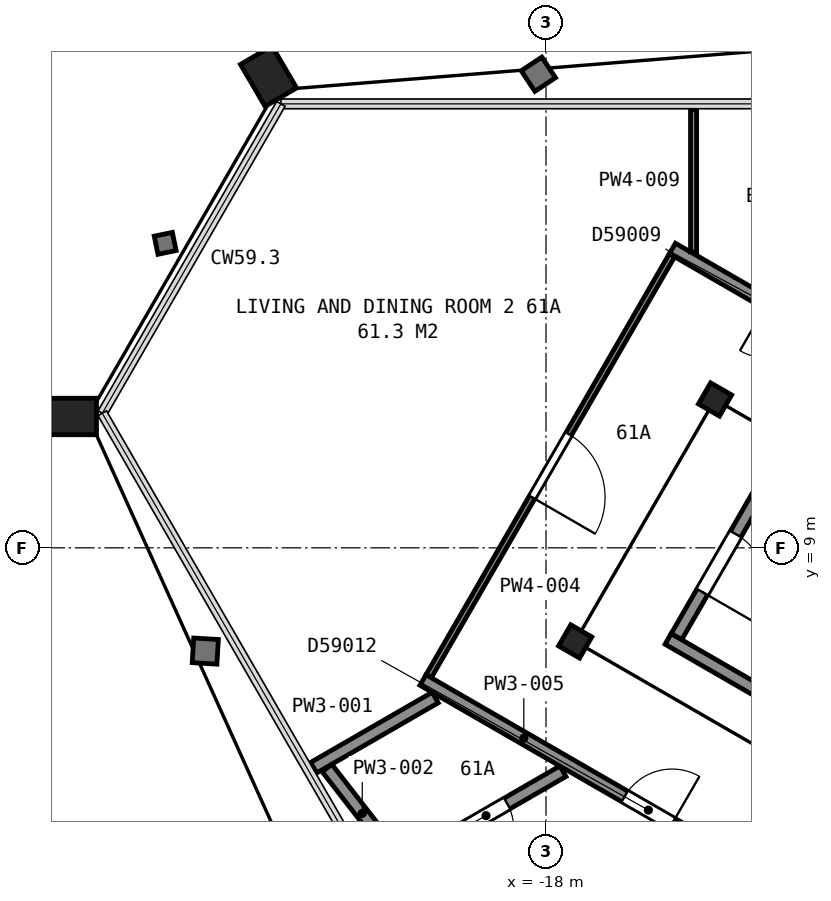
"""IFC4 building model, lengths in metres.
Left out: names, types, materials, properties, quantities, classifications, styles, units other than length and angle.
Written with IfcOpenShell. Run it as: python <this file> out.ifc"""

import sys

from ifc_helpers import new_model, si_unit, direction, frame, frame_2d, origin, origin_2d, place, context, subcontext, project, spatial, rectangle, hollow_rectangle, i_section, extrude, element, fill, save


model = new_model("IFC4")
c1 = context("Model", 3, precision=1e-05, world=origin(), true_north=direction((0.0, 1.0)))
c2 = subcontext(c1, "Body", "Model", "MODEL_VIEW")
j1 = project(units=[si_unit("LENGTHUNIT", "METRE"), si_unit("PLANEANGLEUNIT", "RADIAN")], contexts=[c1])
p1 = place(None, origin())
s1 = spatial("IfcSite", under=j1, at=p1, CompositionType="ELEMENT")
p2 = place(p1, origin())
s2 = spatial("IfcBuilding", under=s1, at=p2, CompositionType="ELEMENT")
p3 = place(p2, frame((0.0, 0.0, 243.4)))
s3 = spatial("IfcBuildingStorey", under=s2, at=p3, CompositionType="ELEMENT", Elevation=243.4)
p4 = place(p3, frame((-22.437, 16.542, 0.065), z_axis=(-0.108220616639, 0.184843485334, 0.976791269445), x_axis=(0.497243302429, 0.86088562472, -0.107819475699)))
e1 = element("IfcColumn", 1, at=p4, inside=s3, PredefinedType="COLUMN", context=c2, shape_type="SweptSolid", body=[
    extrude(hollow_rectangle(XDim=0.6, YDim=0.8, WallThickness=0.05, at=origin_2d()), origin(), (0.0, 0.0, 1.0), 3.655),
])
p5 = place(p3, frame((-25.544, 11.16, 0.065), z_axis=(-0.213852283996, 0.0, 0.976866009558), x_axis=(0.497031900956, 0.860883256594, 0.10880858398)))
e2 = element("IfcColumn", 2, at=p5, inside=s3, PredefinedType="COLUMN", context=c2, shape_type="SweptSolid", body=[
    extrude(hollow_rectangle(XDim=0.6, YDim=0.8, WallThickness=0.05, at=origin_2d()), origin(), (0.0, 0.0, 1.0), 3.654),
])
for number, where, z_axis, x_axis in (
    (3, (-15.22, 11.44, 0.0), (0.0, 0.0, 1.0), (0.5, 0.866, 0.0)),
    (4, (-17.52, 7.46, 0.0), (0.0, 0.0, 1.0), (0.5, 0.866, 0.0)),
):
    element("IfcColumn", number, at=place(p3, frame(where, z_axis=z_axis, x_axis=x_axis)), inside=s3, PredefinedType="COLUMN", context=c2, shape_type="SweptSolid", body=[
        extrude(i_section(OverallWidth=0.401, OverallDepth=0.399, WebThickness=0.025, FlangeThickness=0.04, FilletRadius=0.015, at=origin_2d()), origin(), (0.0, 0.0, 1.0), 3.7),
    ])
p6 = place(p3, frame((-14.455, 9.962, 0.0), z_axis=(0.0, 0.0, 1.0), x_axis=(-0.500049511043, -0.865996816683, 0.0)))
e5 = element("IfcWall", 5, at=p6, inside=s3, PredefinedType="PARTITIONING", context=c2, shape_type="SweptSolid", body=[
    extrude(rectangle(XDim=2.8, YDim=0.2, at=frame_2d((1.4, 0.0))), origin(), (0.0, 0.0, 1.0), 3.45),
])
p7 = place(p6, frame((0.85, 0.0, 0.0)))
e6 = element("IfcOpeningElement", 6, at=p7, cuts=e5, PredefinedType="OPENING", context=c2, shape_type="SweptSolid", body=[
    extrude(rectangle(XDim=1.1, YDim=2.1, at=frame_2d((0.55, 1.05))), frame((0.0, 0.11, 0.0), z_axis=(0.0, -1.0, 0.0), x_axis=(1.0, 0.0, 0.0)), (0.0, 0.0, 1.0), 0.22),
])
p8 = place(p3, frame((-7.678, 2.701, 0.0), z_axis=(0.0, 0.0, 1.0), x_axis=(-0.866019993635, 0.500009370536, 0.0)))
e7 = element("IfcWall", 7, at=p8, inside=s3, PredefinedType="PARTITIONING", context=c2, shape_type="SweptSolid", body=[
    extrude(rectangle(XDim=9.6, YDim=0.2, at=frame_2d((4.8, 0.0))), origin(), (0.0, 0.0, 1.0), 3.45),
])
p9 = place(p3, frame((-21.821, 5.384, 0.0), z_axis=(0.0, 0.0, 1.0), x_axis=(0.866178541367, 0.499734664072, 0.0)))
e8 = element("IfcWall", 8, at=p9, inside=s3, PredefinedType="PARTITIONING", context=c2, shape_type="SweptSolid", body=[
    extrude(rectangle(XDim=2.308, YDim=0.2, at=frame_2d((1.154, 0.0))), origin(), (0.0, 0.0, 1.0), 2.713),
])
p10 = place(p3, frame((-21.602, 5.378, 0.0), z_axis=(0.0, 0.0, 1.0), x_axis=(0.613269592497, -0.789873665163, 0.0)))
e9 = element("IfcWall", 9, at=p10, inside=s3, PredefinedType="PARTITIONING", context=c2, shape_type="SweptSolid", body=[
    extrude(rectangle(XDim=1.89, YDim=0.2, at=frame_2d((0.945, 0.0))), origin(), (0.0, 0.0, 1.0), 2.713),
])
p11 = place(p3, frame((-20.458, 3.745, 0.0), z_axis=(0.0, 0.0, 1.0), x_axis=(0.865942402911, 0.500143734182, 0.0)))
e10 = element("IfcWall", 10, at=p11, inside=s3, PredefinedType="PARTITIONING", context=c2, shape_type="SweptSolid", body=[
    extrude(rectangle(XDim=3.16, YDim=0.2, at=frame_2d((1.58, 0.0))), origin(), (0.0, 0.0, 1.0), 2.713),
])
p12 = place(p11, frame((1.3, 0.0, 0.0)))
e11 = element("IfcOpeningElement", 11, at=p12, cuts=e10, PredefinedType="OPENING", context=c2, shape_type="SweptSolid", body=[
    extrude(rectangle(XDim=0.8, YDim=2.1, at=frame_2d((0.4, 1.05))), frame((0.0, 0.11, 0.0), z_axis=(0.0, -1.0, 0.0), x_axis=(1.0, 0.0, 0.0)), (0.0, 0.0, 1.0), 0.22),
])
p13 = place(p3, frame((-19.93, 6.888, 0.0), z_axis=(0.0, 0.0, 1.0), x_axis=(0.500420003794, 0.865782778648, 0.0)))
e12 = element("IfcWall", 12, at=p13, inside=s3, PredefinedType="PARTITIONING", context=c2, shape_type="SweptSolid", body=[
    extrude(rectangle(XDim=7.997, YDim=0.1, at=frame_2d((3.999, 0.0))), origin(), (0.0, 0.0, 1.0), 2.713),
])
p14 = place(p13, frame((3.4, 0.0, 0.0)))
e13 = element("IfcOpeningElement", 13, at=p14, cuts=e12, PredefinedType="OPENING", context=c2, shape_type="SweptSolid", body=[
    extrude(rectangle(XDim=1.2, YDim=2.1, at=frame_2d((0.6, 1.05))), frame((0.0, 0.06, 0.0), z_axis=(0.0, -1.0, 0.0), x_axis=(1.0, 0.0, 0.0)), (0.0, 0.0, 1.0), 0.12),
])
p15 = place(p3, frame((-12.995, 2.77, 0.0), z_axis=(0.0, 0.0, 1.0), x_axis=(-0.866100425926, 0.499870035319, 0.0)))
e14 = element("IfcWall", 14, at=p15, inside=s3, PredefinedType="PARTITIONING", context=c2, shape_type="SweptSolid", body=[
    extrude(rectangle(XDim=8.115, YDim=0.2, at=frame_2d((4.058, 0.0))), origin(), (0.0, 0.0, 1.0), 2.713),
])
p16 = place(p15, frame((3.385, 0.0, 0.0)))
e15 = element("IfcOpeningElement", 15, at=p16, cuts=e14, PredefinedType="OPENING", context=c2, shape_type="SweptSolid", body=[
    extrude(rectangle(XDim=0.9, YDim=2.1, at=frame_2d((0.45, 1.05))), frame((0.0, 0.11, 0.0), z_axis=(0.0, -1.0, 0.0), x_axis=(1.0, 0.0, 0.0)), (0.0, 0.0, 1.0), 0.22),
])
p17 = place(p15, frame((0.665, 0.0, 0.0)))
e16 = element("IfcOpeningElement", 16, at=p17, cuts=e14, PredefinedType="OPENING", context=c2, shape_type="SweptSolid", body=[
    extrude(rectangle(XDim=0.9, YDim=2.1, at=frame_2d((0.45, 1.05))), frame((0.0, 0.11, 0.0), z_axis=(0.0, -1.0, 0.0), x_axis=(1.0, 0.0, 0.0)), (0.0, 0.0, 1.0), 0.22),
])
p18 = place(p3, frame((-15.921, 13.923, 0.0), z_axis=(0.0, 0.0, 1.0), x_axis=(0.866079355551, -0.499906541154, 0.0)))
e17 = element("IfcWall", 17, at=p18, inside=s3, PredefinedType="PARTITIONING", context=c2, shape_type="SweptSolid", body=[
    extrude(rectangle(XDim=8.113, YDim=0.2, at=frame_2d((4.056, 0.0))), origin(), (0.0, 0.0, 1.0), 2.713),
])
p19 = place(p18, frame((1.802, 0.0, 0.0)))
e18 = element("IfcOpeningElement", 18, at=p19, cuts=e17, PredefinedType="OPENING", context=c2, shape_type="SweptSolid", body=[
    extrude(rectangle(XDim=0.9, YDim=2.1, at=frame_2d((0.45, 1.05))), frame((0.0, 0.11, 0.0), z_axis=(0.0, -1.0, 0.0), x_axis=(1.0, 0.0, 0.0)), (0.0, 0.0, 1.0), 0.22),
])
p20 = place(p3, frame((-15.573, 13.866, 0.0), z_axis=(0.0, 0.0, 1.0), x_axis=(0.0, 1.0, 0.0)))
e19 = element("IfcWall", 19, at=p20, inside=s3, PredefinedType="PARTITIONING", context=c2, shape_type="SweptSolid", body=[
    extrude(rectangle(XDim=2.34, YDim=0.1, at=frame_2d((1.17, 0.0))), origin(), (0.0, 0.0, 1.0), 2.713),
])
p21 = place(p7, origin())
e20 = element("IfcDoor", 20, at=p21, inside=s3, OperationType="SINGLE_SWING_RIGHT", PredefinedType="DOOR", context=c2, shape_type="SweptSolid", body=[
    extrude(rectangle(XDim=1.1, YDim=2.1, at=frame_2d((0.55, 1.05))), frame((0.0, 0.025, 0.0), z_axis=(0.0, -1.0, 0.0), x_axis=(1.0, 0.0, 0.0)), (0.0, 0.0, 1.0), 0.05),
])
fill(e6, e20)
p22 = place(p12, origin())
e21 = element("IfcDoor", 21, at=p22, inside=s3, OperationType="SINGLE_SWING_LEFT", PredefinedType="DOOR", context=c2, shape_type="SweptSolid", body=[
    extrude(rectangle(XDim=0.8, YDim=2.1, at=frame_2d((0.4, 1.05))), frame((0.0, 0.025, 0.0), z_axis=(0.0, -1.0, 0.0), x_axis=(1.0, 0.0, 0.0)), (0.0, 0.0, 1.0), 0.05),
])
fill(e11, e21)
p23 = place(p14, origin())
e22 = element("IfcDoor", 22, at=p23, inside=s3, OperationType="SINGLE_SWING_LEFT", PredefinedType="DOOR", context=c2, shape_type="SweptSolid", body=[
    extrude(rectangle(XDim=1.2, YDim=2.1, at=frame_2d((0.6, 1.05))), frame((0.0, 0.025, 0.0), z_axis=(0.0, -1.0, 0.0), x_axis=(1.0, 0.0, 0.0)), (0.0, 0.0, 1.0), 0.05),
])
fill(e13, e22)
p24 = place(p16, origin())
e23 = element("IfcDoor", 23, at=p24, inside=s3, OperationType="SINGLE_SWING_LEFT", PredefinedType="DOOR", context=c2, shape_type="SweptSolid", body=[
    extrude(rectangle(XDim=0.9, YDim=2.1, at=frame_2d((0.45, 1.05))), frame((0.0, 0.025, 0.0), z_axis=(0.0, -1.0, 0.0), x_axis=(1.0, 0.0, 0.0)), (0.0, 0.0, 1.0), 0.05),
])
fill(e15, e23)
save(model, sys.argv[1])
